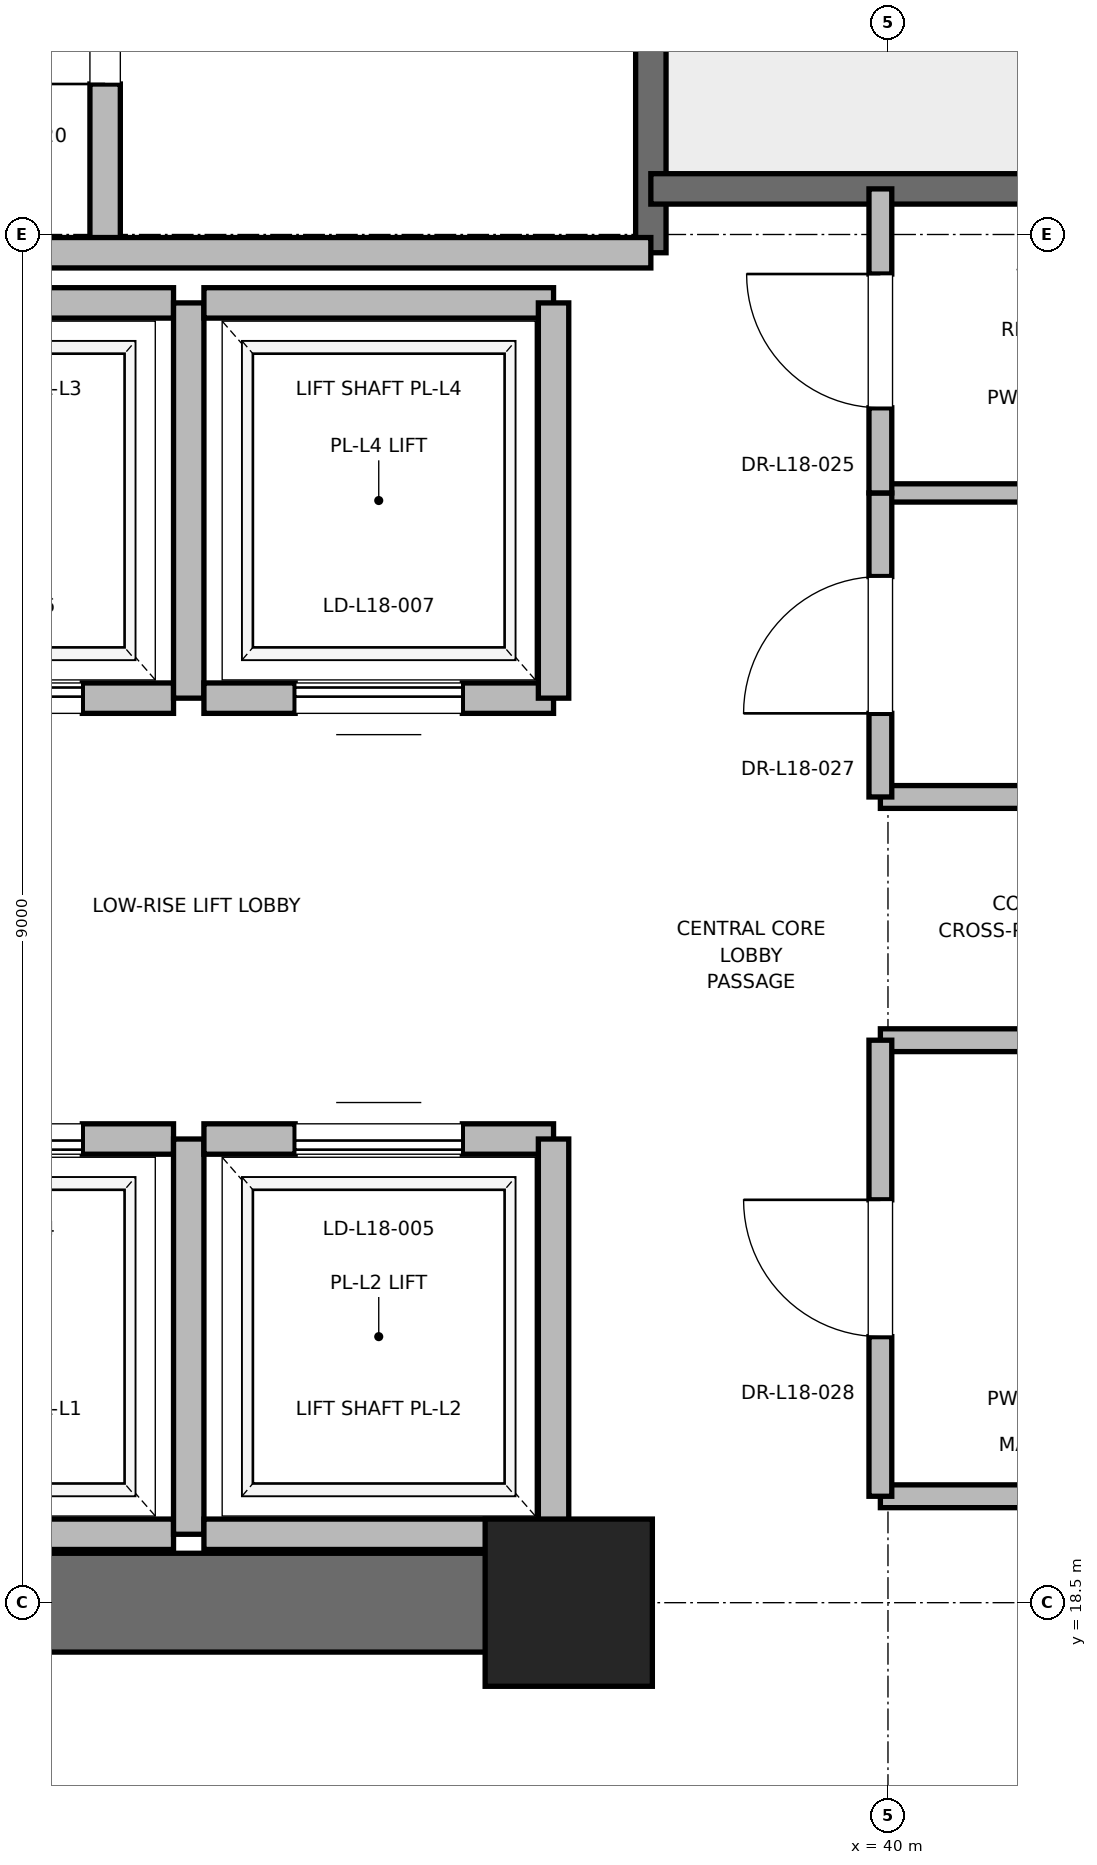
"""IFC4 building model, lengths in metres.
Left out: names, types, materials, properties, quantities, classifications, styles, units other than length and angle.
Written with IfcOpenShell. Run it as: python <this file> out.ifc"""

import sys

from ifc_helpers import new_model, si_unit, direction, frame, frame_2d, origin, origin_2d, place, context, subcontext, project, spatial, rectangle, extrude, element, fill, save


model = new_model("IFC4")
c1 = context("Model", 3, precision=1e-05, world=origin(), true_north=direction((0.0, 1.0)))
c2 = subcontext(c1, "Body", "Model", "MODEL_VIEW")
j1 = project(units=[si_unit("LENGTHUNIT", "METRE"), si_unit("PLANEANGLEUNIT", "RADIAN")], contexts=[c1])
p1 = place(None, origin())
s1 = spatial("IfcSite", under=j1, at=p1, CompositionType="ELEMENT")
p2 = place(p1, origin())
s2 = spatial("IfcBuilding", under=s1, at=p2, CompositionType="ELEMENT")
p3 = place(p2, frame((0.0, 0.0, 79.6)))
s3 = spatial("IfcBuildingStorey", under=s2, at=p3, CompositionType="ELEMENT", Elevation=79.6)
p4 = place(p3, frame((37.9, 18.5, 0.0), z_axis=(0.0, 0.0, 1.0), x_axis=(1.0, 0.0, 0.0)))
e1 = element("IfcColumn", 1, at=p4, inside=s3, PredefinedType="PILASTER", context=c2, shape_type="SweptSolid", body=[
    extrude(rectangle(XDim=1.1, YDim=1.1, at=origin_2d()), origin(), (0.0, 0.0, 1.0), 4.0),
])
p5 = place(p3, frame((29.0, 18.5, 0.0), z_axis=(0.0, 0.0, 1.0), x_axis=(1.0, 0.0, 0.0)))
e2 = element("IfcWall", 2, at=p5, inside=s3, PredefinedType="SHEAR", context=c2, shape_type="SweptSolid", body=[
    extrude(rectangle(XDim=9.2, YDim=0.65, at=frame_2d((4.6, 0.0))), origin(), (0.0, 0.0, 1.0), 3.76),
])
p6 = place(p3, frame((38.44, 27.38, 0.0), z_axis=(0.0, 0.0, 1.0), x_axis=(0.0, 1.0, 0.0)))
e3 = element("IfcWall", 3, at=p6, inside=s3, PredefinedType="SOLIDWALL", context=c2, shape_type="SweptSolid", body=[
    extrude(rectangle(XDim=8.87, YDim=0.2, at=frame_2d((4.435, 0.0))), origin(), (0.0, 0.0, 1.0), 3.76),
])
p7 = place(p3, frame((38.44, 27.8, 0.0), z_axis=(0.0, 0.0, 1.0), x_axis=(1.0, 0.0, 0.0)))
e4 = element("IfcWall", 4, at=p7, inside=s3, PredefinedType="SOLIDWALL", context=c2, shape_type="SweptSolid", body=[
    extrude(rectangle(XDim=3.32, YDim=0.2, at=frame_2d((1.66, 0.0))), origin(), (0.0, 0.0, 1.0), 3.76),
])
p8 = place(p3, frame((34.85, 27.38, 0.0), z_axis=(0.0, 0.0, 1.0), x_axis=(0.0, 1.0, 0.0)))
e5 = element("IfcWall", 5, at=p8, inside=s3, PredefinedType="PARTITIONING", context=c2, shape_type="SweptSolid", body=[
    extrude(rectangle(XDim=3.37, YDim=0.2, at=frame_2d((1.685, 0.0))), origin(), (0.0, 0.0, 1.0), 3.76),
])
p9 = place(p8, frame((1.11, 0.0, 0.0)))
e6 = element("IfcOpeningElement", 6, at=p9, cuts=e5, PredefinedType="OPENING", context=c2, shape_type="SweptSolid", body=[
    extrude(rectangle(XDim=1.15, YDim=2.2, at=frame_2d((0.575, 1.1))), frame((0.0, 0.1, 0.0), z_axis=(0.0, -1.0, 0.0), x_axis=(1.0, 0.0, 0.0)), (0.0, 0.0, 1.0), 0.2),
])
p10 = place(p3, frame((32.82, 27.38, 0.0), z_axis=(0.0, 0.0, 1.0), x_axis=(1.0, 0.0, 0.0)))
e7 = element("IfcWall", 7, at=p10, inside=s3, PredefinedType="PARTITIONING", context=c2, shape_type="SweptSolid", body=[
    extrude(rectangle(XDim=5.62, YDim=0.2, at=frame_2d((2.81, 0.0))), origin(), (0.0, 0.0, 1.0), 3.76),
])
p11 = place(p3, frame((33.0, 18.95, 0.0), z_axis=(0.0, 0.0, 1.0), x_axis=(1.0, 0.0, 0.0)))
e8 = element("IfcWall", 8, at=p11, inside=s3, PredefinedType="SOLIDWALL", context=c2, shape_type="SweptSolid", body=[
    extrude(rectangle(XDim=2.3, YDim=0.2, at=frame_2d((1.15, 0.0))), origin(), (0.0, 0.0, 1.0), 3.76),
])
p12 = place(p3, frame((35.3, 21.55, 0.0), z_axis=(0.0, 0.0, 1.0), x_axis=(-1.0, 0.0, 0.0)))
e9 = element("IfcWall", 9, at=p12, inside=s3, PredefinedType="SOLIDWALL", context=c2, shape_type="SweptSolid", body=[
    extrude(rectangle(XDim=2.3, YDim=0.2, at=frame_2d((1.15, 0.0))), origin(), (0.0, 0.0, 1.0), 3.76),
])
p13 = place(p12, frame((0.6, 0.0, 0.0)))
e10 = element("IfcOpeningElement", 10, at=p13, cuts=e9, PredefinedType="OPENING", context=c2, shape_type="SweptSolid", body=[
    extrude(rectangle(XDim=1.1, YDim=2.2, at=frame_2d((0.55, 1.1))), frame((0.0, 0.1, 0.0), z_axis=(0.0, -1.0, 0.0), x_axis=(1.0, 0.0, 0.0)), (0.0, 0.0, 1.0), 0.2),
])
p14 = place(p3, frame((35.4, 18.95, 0.0), z_axis=(0.0, 0.0, 1.0), x_axis=(0.0, 1.0, 0.0)))
e11 = element("IfcWall", 11, at=p14, inside=s3, PredefinedType="SOLIDWALL", context=c2, shape_type="SweptSolid", body=[
    extrude(rectangle(XDim=2.6, YDim=0.2, at=frame_2d((1.3, 0.0))), origin(), (0.0, 0.0, 1.0), 3.76),
])
p15 = place(p3, frame((35.5, 18.95, 0.0), z_axis=(0.0, 0.0, 1.0), x_axis=(1.0, 0.0, 0.0)))
e12 = element("IfcWall", 12, at=p15, inside=s3, PredefinedType="SOLIDWALL", context=c2, shape_type="SweptSolid", body=[
    extrude(rectangle(XDim=2.3, YDim=0.2, at=frame_2d((1.15, 0.0))), origin(), (0.0, 0.0, 1.0), 2.54),
])
p16 = place(p3, frame((37.8, 21.55, 0.0), z_axis=(0.0, 0.0, 1.0), x_axis=(-1.0, 0.0, 0.0)))
e13 = element("IfcWall", 13, at=p16, inside=s3, PredefinedType="SOLIDWALL", context=c2, shape_type="SweptSolid", body=[
    extrude(rectangle(XDim=2.3, YDim=0.2, at=frame_2d((1.15, 0.0))), origin(), (0.0, 0.0, 1.0), 3.76),
])
p17 = place(p16, frame((0.6, 0.0, 0.0)))
e14 = element("IfcOpeningElement", 14, at=p17, cuts=e13, PredefinedType="OPENING", context=c2, shape_type="SweptSolid", body=[
    extrude(rectangle(XDim=1.1, YDim=2.2, at=frame_2d((0.55, 1.1))), frame((0.0, 0.1, 0.0), z_axis=(0.0, -1.0, 0.0), x_axis=(1.0, 0.0, 0.0)), (0.0, 0.0, 1.0), 0.2),
])
p18 = place(p3, frame((37.8, 18.95, 0.0), z_axis=(0.0, 0.0, 1.0), x_axis=(0.0, 1.0, 0.0)))
e15 = element("IfcWall", 15, at=p18, inside=s3, PredefinedType="SOLIDWALL", context=c2, shape_type="SweptSolid", body=[
    extrude(rectangle(XDim=2.6, YDim=0.2, at=frame_2d((1.3, 0.0))), origin(), (0.0, 0.0, 1.0), 2.54),
])
p19 = place(p3, frame((33.0, 24.45, 0.0), z_axis=(0.0, 0.0, 1.0), x_axis=(1.0, 0.0, 0.0)))
e16 = element("IfcWall", 16, at=p19, inside=s3, PredefinedType="SOLIDWALL", context=c2, shape_type="SweptSolid", body=[
    extrude(rectangle(XDim=2.3, YDim=0.2, at=frame_2d((1.15, 0.0))), origin(), (0.0, 0.0, 1.0), 3.76),
])
p20 = place(p19, frame((0.6, 0.0, 0.0)))
e17 = element("IfcOpeningElement", 17, at=p20, cuts=e16, PredefinedType="OPENING", context=c2, shape_type="SweptSolid", body=[
    extrude(rectangle(XDim=1.1, YDim=2.2, at=frame_2d((0.55, 1.1))), frame((0.0, 0.1, 0.0), z_axis=(0.0, -1.0, 0.0), x_axis=(1.0, 0.0, 0.0)), (0.0, 0.0, 1.0), 0.2),
])
p21 = place(p3, frame((35.3, 27.05, 0.0), z_axis=(0.0, 0.0, 1.0), x_axis=(-1.0, 0.0, 0.0)))
e18 = element("IfcWall", 18, at=p21, inside=s3, PredefinedType="SOLIDWALL", context=c2, shape_type="SweptSolid", body=[
    extrude(rectangle(XDim=2.3, YDim=0.2, at=frame_2d((1.15, 0.0))), origin(), (0.0, 0.0, 1.0), 3.76),
])
p22 = place(p3, frame((35.4, 24.45, 0.0), z_axis=(0.0, 0.0, 1.0), x_axis=(0.0, 1.0, 0.0)))
e19 = element("IfcWall", 19, at=p22, inside=s3, PredefinedType="SOLIDWALL", context=c2, shape_type="SweptSolid", body=[
    extrude(rectangle(XDim=2.6, YDim=0.2, at=frame_2d((1.3, 0.0))), origin(), (0.0, 0.0, 1.0), 3.76),
])
p23 = place(p3, frame((35.5, 24.45, 0.0), z_axis=(0.0, 0.0, 1.0), x_axis=(1.0, 0.0, 0.0)))
e20 = element("IfcWall", 20, at=p23, inside=s3, PredefinedType="SOLIDWALL", context=c2, shape_type="SweptSolid", body=[
    extrude(rectangle(XDim=2.3, YDim=0.2, at=frame_2d((1.15, 0.0))), origin(), (0.0, 0.0, 1.0), 3.76),
])
p24 = place(p23, frame((0.6, 0.0, 0.0)))
e21 = element("IfcOpeningElement", 21, at=p24, cuts=e20, PredefinedType="OPENING", context=c2, shape_type="SweptSolid", body=[
    extrude(rectangle(XDim=1.1, YDim=2.2, at=frame_2d((0.55, 1.1))), frame((0.0, 0.1, 0.0), z_axis=(0.0, -1.0, 0.0), x_axis=(1.0, 0.0, 0.0)), (0.0, 0.0, 1.0), 0.2),
])
p25 = place(p3, frame((37.8, 27.05, 0.0), z_axis=(0.0, 0.0, 1.0), x_axis=(-1.0, 0.0, 0.0)))
e22 = element("IfcWall", 22, at=p25, inside=s3, PredefinedType="SOLIDWALL", context=c2, shape_type="SweptSolid", body=[
    extrude(rectangle(XDim=2.3, YDim=0.2, at=frame_2d((1.15, 0.0))), origin(), (0.0, 0.0, 1.0), 3.76),
])
p26 = place(p3, frame((37.8, 24.45, 0.0), z_axis=(0.0, 0.0, 1.0), x_axis=(0.0, 1.0, 0.0)))
e23 = element("IfcWall", 23, at=p26, inside=s3, PredefinedType="SOLIDWALL", context=c2, shape_type="SweptSolid", body=[
    extrude(rectangle(XDim=2.6, YDim=0.2, at=frame_2d((1.3, 0.0))), origin(), (0.0, 0.0, 1.0), 3.76),
])
for number, where, z_axis, x_axis in (
    (24, (39.95, 19.2, 0.0), (0.0, 0.0, 1.0), (1.0, 0.0, 0.0)),
    (25, (39.95, 22.2, 0.0), (0.0, 0.0, 1.0), (1.0, 0.0, 0.0)),
    (26, (39.95, 23.8, 0.0), (0.0, 0.0, 1.0), (1.0, 0.0, 0.0)),
):
    element("IfcWall", number, at=place(p3, frame(where, z_axis=z_axis, x_axis=x_axis)), inside=s3, PredefinedType="PARTITIONING", context=c2, shape_type="SweptSolid", body=[
        extrude(rectangle(XDim=1.81, YDim=0.15, at=frame_2d((0.905, 0.0))), origin(), (0.0, 0.0, 1.0), 2.85),
    ])
p27 = place(p3, frame((39.95, 25.8, 0.0), z_axis=(0.0, 0.0, 1.0), x_axis=(1.0, 0.0, 0.0)))
e27 = element("IfcWall", 27, at=p27, inside=s3, PredefinedType="PARTITIONING", context=c2, shape_type="SweptSolid", body=[
    extrude(rectangle(XDim=1.81, YDim=0.12, at=frame_2d((0.905, 0.0))), origin(), (0.0, 0.0, 1.0), 2.85),
])
p28 = place(p3, frame((39.95, 19.2, 0.0), z_axis=(0.0, 0.0, 1.0), x_axis=(0.0, 1.0, 0.0)))
e28 = element("IfcWall", 28, at=p28, inside=s3, PredefinedType="PARTITIONING", context=c2, shape_type="SweptSolid", body=[
    extrude(rectangle(XDim=3.0, YDim=0.15, at=frame_2d((1.5, 0.0))), origin(), (0.0, 0.0, 1.0), 2.85),
])
p29 = place(p28, frame((1.05, 0.0, 0.0)))
e29 = element("IfcOpeningElement", 29, at=p29, cuts=e28, PredefinedType="OPENING", context=c2, shape_type="SweptSolid", body=[
    extrude(rectangle(XDim=0.9, YDim=2.1, at=frame_2d((0.45, 1.05))), frame((0.0, 0.075, 0.0), z_axis=(0.0, -1.0, 0.0), x_axis=(1.0, 0.0, 0.0)), (0.0, 0.0, 1.0), 0.15),
])
p30 = place(p3, frame((39.95, 23.8, 0.0), z_axis=(0.0, 0.0, 1.0), x_axis=(0.0, 1.0, 0.0)))
e30 = element("IfcWall", 30, at=p30, inside=s3, PredefinedType="PARTITIONING", context=c2, shape_type="SweptSolid", body=[
    extrude(rectangle(XDim=2.0, YDim=0.15, at=frame_2d((1.0, 0.0))), origin(), (0.0, 0.0, 1.0), 2.85),
])
p31 = place(p30, frame((0.55, 0.0, 0.0)))
e31 = element("IfcOpeningElement", 31, at=p31, cuts=e30, PredefinedType="OPENING", context=c2, shape_type="SweptSolid", body=[
    extrude(rectangle(XDim=0.9, YDim=2.1, at=frame_2d((0.45, 1.05))), frame((0.0, 0.075, 0.0), z_axis=(0.0, -1.0, 0.0), x_axis=(1.0, 0.0, 0.0)), (0.0, 0.0, 1.0), 0.15),
])
p32 = place(p3, frame((39.95, 25.8, 0.0), z_axis=(0.0, 0.0, 1.0), x_axis=(0.0, 1.0, 0.0)))
e32 = element("IfcWall", 32, at=p32, inside=s3, PredefinedType="PARTITIONING", context=c2, shape_type="SweptSolid", body=[
    extrude(rectangle(XDim=2.0, YDim=0.15, at=frame_2d((1.0, 0.0))), origin(), (0.0, 0.0, 1.0), 2.85),
])
p33 = place(p32, frame((0.56, 0.0, 0.0)))
e33 = element("IfcOpeningElement", 33, at=p33, cuts=e32, PredefinedType="OPENING", context=c2, shape_type="SweptSolid", body=[
    extrude(rectangle(XDim=0.88, YDim=2.1, at=frame_2d((0.44, 1.05))), frame((0.0, 0.075, 0.0), z_axis=(0.0, -1.0, 0.0), x_axis=(1.0, 0.0, 0.0)), (0.0, 0.0, 1.0), 0.15),
])
p34 = place(p9, origin())
e34 = element("IfcDoor", 34, at=p34, inside=s3, OperationType="SINGLE_SWING_LEFT", PredefinedType="DOOR", context=c2, shape_type="SweptSolid", body=[
    extrude(rectangle(XDim=1.15, YDim=2.2, at=frame_2d((0.575, 1.1))), frame((0.0, 0.025, 0.0), z_axis=(0.0, -1.0, 0.0), x_axis=(1.0, 0.0, 0.0)), (0.0, 0.0, 1.0), 0.05),
])
fill(e6, e34)
p35 = place(p13, origin())
e35 = element("IfcDoor", 35, at=p35, inside=s3, OperationType="SLIDING_TO_RIGHT", PredefinedType="DOOR", context=c2, shape_type="SweptSolid", body=[
    extrude(rectangle(XDim=1.1, YDim=2.2, at=frame_2d((0.55, 1.1))), frame((0.0, 0.025, 0.0), z_axis=(0.0, -1.0, 0.0), x_axis=(1.0, 0.0, 0.0)), (0.0, 0.0, 1.0), 0.05),
])
fill(e10, e35)
p36 = place(p17, origin())
e36 = element("IfcDoor", 36, at=p36, inside=s3, OperationType="SLIDING_TO_RIGHT", PredefinedType="DOOR", context=c2, shape_type="SweptSolid", body=[
    extrude(rectangle(XDim=1.1, YDim=2.2, at=frame_2d((0.55, 1.1))), frame((0.0, 0.025, 0.0), z_axis=(0.0, -1.0, 0.0), x_axis=(1.0, 0.0, 0.0)), (0.0, 0.0, 1.0), 0.05),
])
fill(e14, e36)
p37 = place(p20, origin())
e37 = element("IfcDoor", 37, at=p37, inside=s3, OperationType="SLIDING_TO_RIGHT", PredefinedType="DOOR", context=c2, shape_type="SweptSolid", body=[
    extrude(rectangle(XDim=1.1, YDim=2.2, at=frame_2d((0.55, 1.1))), frame((0.0, 0.025, 0.0), z_axis=(0.0, -1.0, 0.0), x_axis=(1.0, 0.0, 0.0)), (0.0, 0.0, 1.0), 0.05),
])
fill(e17, e37)
p38 = place(p24, origin())
e38 = element("IfcDoor", 38, at=p38, inside=s3, OperationType="SLIDING_TO_RIGHT", PredefinedType="DOOR", context=c2, shape_type="SweptSolid", body=[
    extrude(rectangle(XDim=1.1, YDim=2.2, at=frame_2d((0.55, 1.1))), frame((0.0, 0.025, 0.0), z_axis=(0.0, -1.0, 0.0), x_axis=(1.0, 0.0, 0.0)), (0.0, 0.0, 1.0), 0.05),
])
fill(e21, e38)
p39 = place(p29, origin())
e39 = element("IfcDoor", 39, at=p39, inside=s3, OperationType="SINGLE_SWING_RIGHT", PredefinedType="DOOR", context=c2, shape_type="SweptSolid", body=[
    extrude(rectangle(XDim=0.9, YDim=2.1, at=frame_2d((0.45, 1.05))), frame((0.0, 0.025, 0.0), z_axis=(0.0, -1.0, 0.0), x_axis=(1.0, 0.0, 0.0)), (0.0, 0.0, 1.0), 0.05),
])
fill(e29, e39)
p40 = place(p31, origin())
e40 = element("IfcDoor", 40, at=p40, inside=s3, OperationType="SINGLE_SWING_LEFT", PredefinedType="DOOR", context=c2, shape_type="SweptSolid", body=[
    extrude(rectangle(XDim=0.9, YDim=2.1, at=frame_2d((0.45, 1.05))), frame((0.0, 0.025, 0.0), z_axis=(0.0, -1.0, 0.0), x_axis=(1.0, 0.0, 0.0)), (0.0, 0.0, 1.0), 0.05),
])
fill(e31, e40)
p41 = place(p33, origin())
e41 = element("IfcDoor", 41, at=p41, inside=s3, OperationType="SINGLE_SWING_RIGHT", PredefinedType="DOOR", context=c2, shape_type="SweptSolid", body=[
    extrude(rectangle(XDim=0.88, YDim=2.1, at=frame_2d((0.44, 1.05))), frame((0.0, 0.025, 0.0), z_axis=(0.0, -1.0, 0.0), x_axis=(1.0, 0.0, 0.0)), (0.0, 0.0, 1.0), 0.05),
])
fill(e33, e41)
save(model, sys.argv[1])
